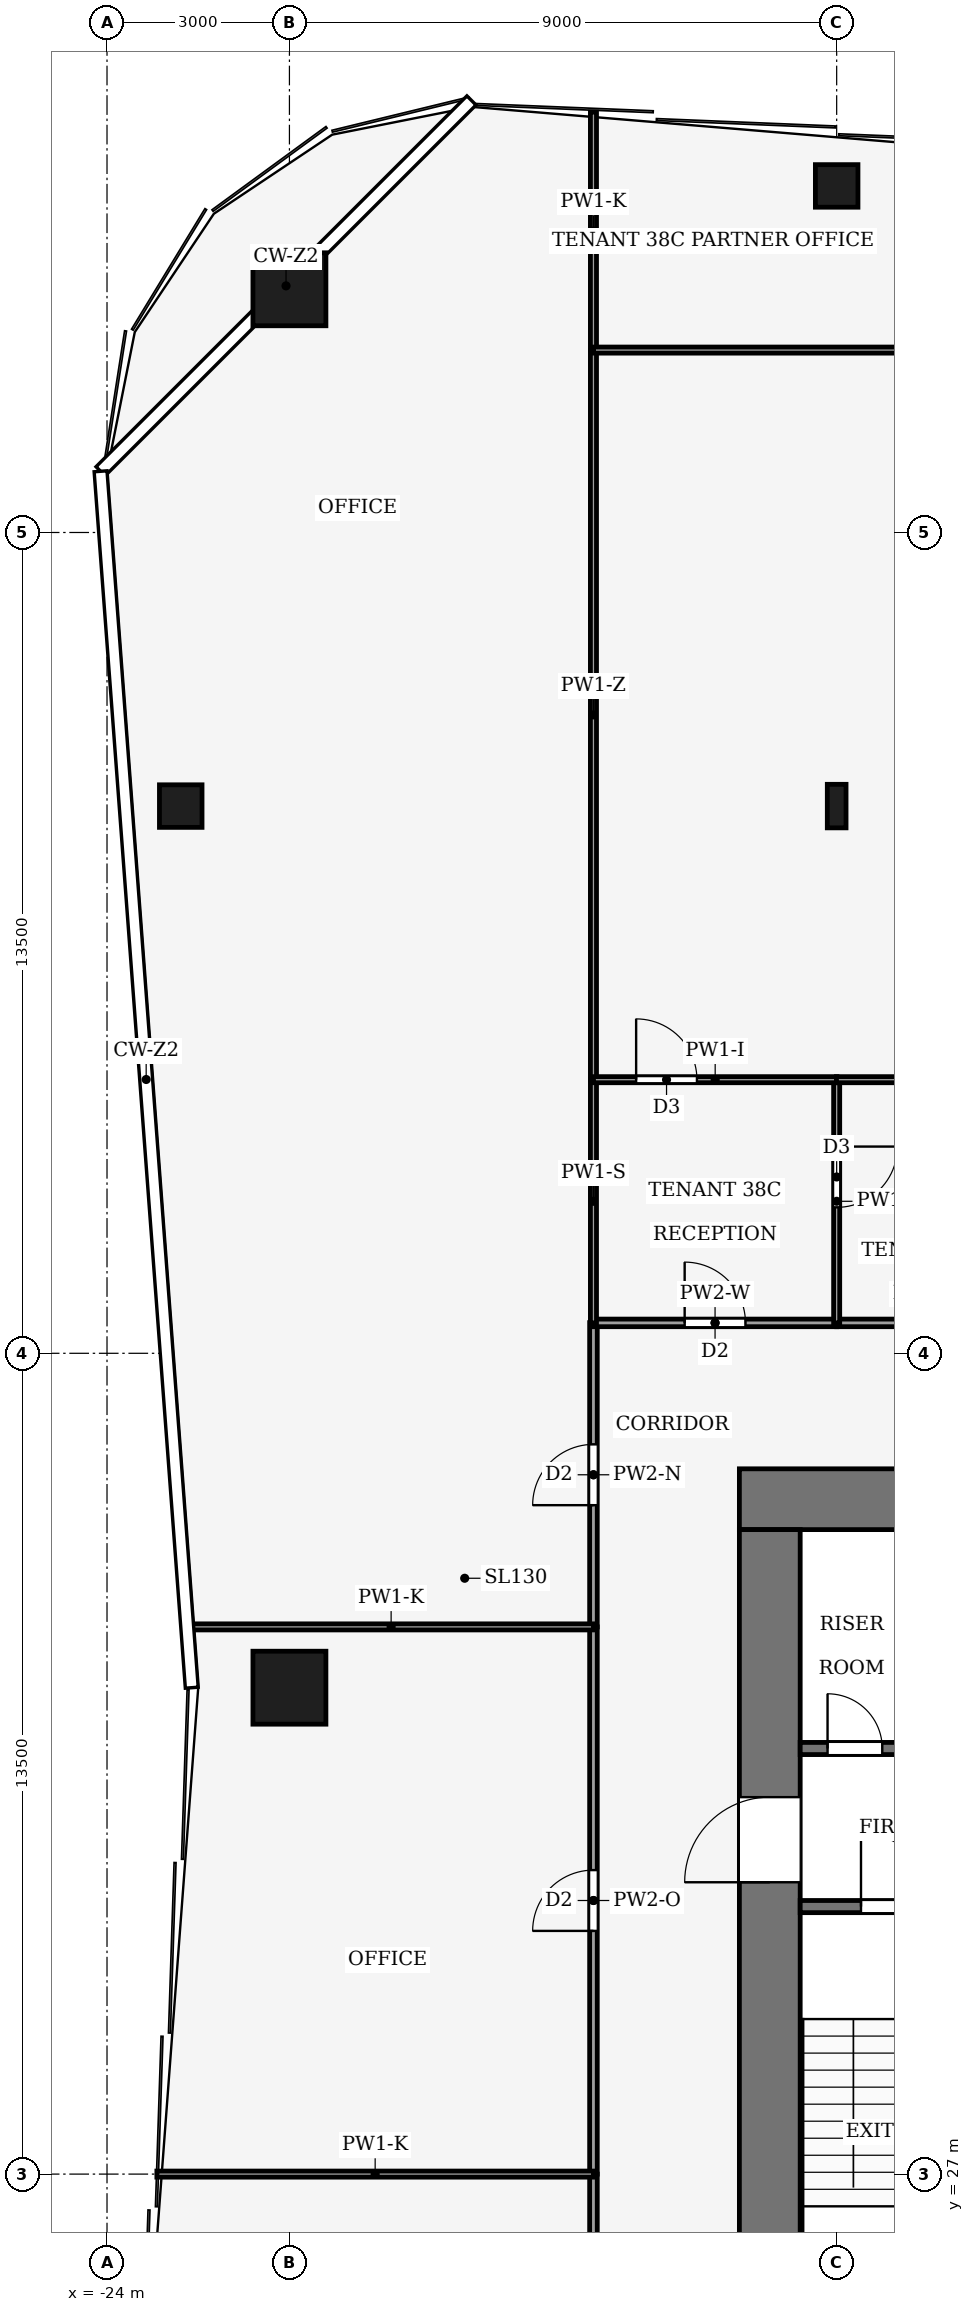
"""IFC4 building model, lengths in metres.
Left out: names, types, materials, properties, quantities, classifications, styles, units other than length and angle.
Written with IfcOpenShell. Run it as: python <this file> out.ifc"""

import sys

from ifc_helpers import new_model, si_unit, direction, frame, frame_2d, origin, origin_2d, place, context, subcontext, project, spatial, rectangle, hollow_rectangle, i_section, extrude, element, fill, save


model = new_model("IFC4")
c1 = context("Model", 3, precision=1e-05, world=origin(), true_north=direction((0.0, 1.0)))
c2 = subcontext(c1, "Body", "Model", "MODEL_VIEW")
j1 = project(units=[si_unit("LENGTHUNIT", "METRE"), si_unit("PLANEANGLEUNIT", "RADIAN")], contexts=[c1])
p1 = place(None, origin())
s1 = spatial("IfcSite", under=j1, at=p1, CompositionType="ELEMENT")
p2 = place(p1, origin())
s2 = spatial("IfcBuilding", under=s1, at=p2, CompositionType="ELEMENT")
p3 = place(p2, frame((0.0, 0.0, 166.0)))
s3 = spatial("IfcBuildingStorey", under=s2, at=p3, CompositionType="ELEMENT", Elevation=166.0)
p4 = place(p3, frame((-13.6, 38.1, -0.13), z_axis=(0.0, 0.0, 1.0), x_axis=(1.0, 0.0, 0.0)))
e1 = element("IfcWall", 1, at=p4, inside=s3, PredefinedType="SHEAR", context=c2, shape_type="SweptSolid", body=[
    extrude(rectangle(XDim=27.2, YDim=1.0, at=frame_2d((13.6, 0.0))), origin(), (0.0, 0.0, 1.0), 3.88),
])
p5 = place(p3, frame((-13.1, 18.4, -0.13), z_axis=(0.0, 0.0, 1.0), x_axis=(0.0, 1.0, 0.0)))
e2 = element("IfcWall", 2, at=p5, inside=s3, PredefinedType="SHEAR", context=c2, shape_type="SweptSolid", body=[
    extrude(rectangle(XDim=19.2, YDim=1.0, at=frame_2d((9.6, 0.0))), origin(), (0.0, 0.0, 1.0), 3.88),
])
p6 = place(p5, frame((2.8, 0.0, 0.13)))
e3 = element("IfcOpeningElement", 3, at=p6, cuts=e2, PredefinedType="OPENING", context=c2, shape_type="SweptSolid", body=[
    extrude(rectangle(XDim=2.4, YDim=2.4, at=frame_2d((1.2, 1.2))), frame((0.0, 0.51, 0.0), z_axis=(0.0, -1.0, 0.0), x_axis=(1.0, 0.0, 0.0)), (0.0, 0.0, 1.0), 1.02),
])
p7 = place(p5, frame((13.4, 0.0, 0.13)))
e4 = element("IfcOpeningElement", 4, at=p7, cuts=e2, PredefinedType="OPENING", context=c2, shape_type="SweptSolid", body=[
    extrude(rectangle(XDim=1.4, YDim=2.2, at=frame_2d((0.7, 1.1))), frame((0.0, 0.51, 0.0), z_axis=(0.0, -1.0, 0.0), x_axis=(1.0, 0.0, 0.0)), (0.0, 0.0, 1.0), 1.02),
])
for number, where, z_axis, x_axis in (
    (5, (-21.0, 58.0, 0.0), (0.0, 0.0, 1.0), (1.0, 0.0, 0.0)),
    (6, (-21.0, 35.0, 0.0), (0.0, 0.0, 1.0), (1.0, 0.0, 0.0)),
):
    element("IfcColumn", number, at=place(p3, frame(where, z_axis=z_axis, x_axis=x_axis)), inside=s3, PredefinedType="COLUMN", context=c2, shape_type="SweptSolid", body=[
        extrude(hollow_rectangle(XDim=1.2, YDim=1.2, WallThickness=0.07, at=origin_2d()), origin(), (0.0, 0.0, 1.0), 4.0),
    ])
for number, where, z_axis, x_axis in (
    (7, (-12.0, 59.7, 0.0), (0.0, 0.0, 1.0), (1.0, 0.0, 0.0)),
    (8, (-22.788, 49.5, 0.0), (0.0, 0.0, 1.0), (1.0, 0.0, 0.0)),
):
    element("IfcColumn", number, at=place(p3, frame(where, z_axis=z_axis, x_axis=x_axis)), inside=s3, PredefinedType="COLUMN", context=c2, shape_type="SweptSolid", body=[
        extrude(hollow_rectangle(XDim=0.7, YDim=0.7, WallThickness=0.03, at=origin_2d()), origin(), (0.0, 0.0, 1.0), 4.0),
    ])
p8 = place(p3, frame((-12.0, 49.5, 0.0), z_axis=(0.0, 0.0, 1.0), x_axis=(1.0, 0.0, 0.0)))
e9 = element("IfcColumn", 9, at=p8, inside=s3, PredefinedType="COLUMN", context=c2, shape_type="SweptSolid", body=[
    extrude(i_section(OverallWidth=0.308, OverallDepth=0.716, WebThickness=0.021, FlangeThickness=0.04, FilletRadius=0.027, at=origin_2d()), origin(), (0.0, 0.0, 1.0), 4.0),
])
p9 = place(p3, frame((-12.6, 31.4, 0.0), z_axis=(0.0, 0.0, 1.0), x_axis=(1.0, 0.0, 0.0)))
e10 = element("IfcWall", 10, at=p9, inside=s3, PredefinedType="PARTITIONING", context=c2, shape_type="SweptSolid", body=[
    extrude(rectangle(XDim=6.6, YDim=0.2, at=frame_2d((3.3, 0.0))), origin(), (0.0, 0.0, 1.0), 3.75),
])
p10 = place(p9, frame((1.0, 0.0, 0.0)))
e11 = element("IfcOpeningElement", 11, at=p10, cuts=e10, PredefinedType="OPENING", context=c2, shape_type="SweptSolid", body=[
    extrude(rectangle(XDim=1.2, YDim=2.2, at=frame_2d((0.6, 1.1))), frame((0.0, 0.11, 0.0), z_axis=(0.0, -1.0, 0.0), x_axis=(1.0, 0.0, 0.0)), (0.0, 0.0, 1.0), 0.22),
])
p11 = place(p3, frame((-12.6, 34.0, 0.0), z_axis=(0.0, 0.0, 1.0), x_axis=(1.0, 0.0, 0.0)))
e12 = element("IfcWall", 12, at=p11, inside=s3, PredefinedType="PARTITIONING", context=c2, shape_type="SweptSolid", body=[
    extrude(rectangle(XDim=6.6, YDim=0.2, at=frame_2d((3.3, 0.0))), origin(), (0.0, 0.0, 1.0), 3.75),
])
p12 = place(p11, frame((4.7, 0.0, 0.0)))
e13 = element("IfcOpeningElement", 13, at=p12, cuts=e12, PredefinedType="OPENING", context=c2, shape_type="SweptSolid", body=[
    extrude(rectangle(XDim=1.4, YDim=2.2, at=frame_2d((0.7, 1.1))), frame((0.0, 0.11, 0.0), z_axis=(0.0, -1.0, 0.0), x_axis=(1.0, 0.0, 0.0)), (0.0, 0.0, 1.0), 0.22),
])
p13 = place(p11, frame((2.3, 0.0, 0.0)))
e14 = element("IfcOpeningElement", 14, at=p13, cuts=e12, PredefinedType="OPENING", context=c2, shape_type="SweptSolid", body=[
    extrude(rectangle(XDim=1.4, YDim=2.2, at=frame_2d((0.7, 1.1))), frame((0.0, 0.11, 0.0), z_axis=(0.0, -1.0, 0.0), x_axis=(1.0, 0.0, 0.0)), (0.0, 0.0, 1.0), 0.22),
])
p14 = place(p11, frame((0.45, 0.0, 0.0)))
e15 = element("IfcOpeningElement", 15, at=p14, cuts=e12, PredefinedType="OPENING", context=c2, shape_type="SweptSolid", body=[
    extrude(rectangle(XDim=0.9, YDim=2.1, at=frame_2d((0.45, 1.05))), frame((0.0, 0.11, 0.0), z_axis=(0.0, -1.0, 0.0), x_axis=(1.0, 0.0, 0.0)), (0.0, 0.0, 1.0), 0.22),
])
p15 = place(p3, frame((-16.0, 24.0, 0.0), z_axis=(0.0, 0.0, 1.0), x_axis=(0.0, 1.0, 0.0)))
e16 = element("IfcWall", 16, at=p15, inside=s3, PredefinedType="PARTITIONING", context=c2, shape_type="SweptSolid", body=[
    extrude(rectangle(XDim=3.0, YDim=0.125, at=frame_2d((1.5, 0.0))), origin(), (0.0, 0.0, 1.0), 3.75),
])
p16 = place(p15, frame((1.05, 0.0, 0.0)))
e17 = element("IfcOpeningElement", 17, at=p16, cuts=e16, PredefinedType="OPENING", context=c2, shape_type="SweptSolid", body=[
    extrude(rectangle(XDim=0.9, YDim=2.1, at=frame_2d((0.45, 1.05))), frame((0.0, 0.073, 0.0), z_axis=(0.0, -1.0, 0.0), x_axis=(1.0, 0.0, 0.0)), (0.0, 0.0, 1.0), 0.145),
])
p17 = place(p3, frame((-16.0, 27.0, 0.0), z_axis=(0.0, 0.0, 1.0), x_axis=(0.0, 1.0, 0.0)))
e18 = element("IfcWall", 18, at=p17, inside=s3, PredefinedType="PARTITIONING", context=c2, shape_type="SweptSolid", body=[
    extrude(rectangle(XDim=9.0, YDim=0.125, at=frame_2d((4.5, 0.0))), origin(), (0.0, 0.0, 1.0), 3.36),
])
p18 = place(p17, frame((4.0, 0.0, 0.0)))
e19 = element("IfcOpeningElement", 19, at=p18, cuts=e18, PredefinedType="OPENING", context=c2, shape_type="SweptSolid", body=[
    extrude(rectangle(XDim=1.0, YDim=2.1, at=frame_2d((0.5, 1.05))), frame((0.0, 0.073, 0.0), z_axis=(0.0, -1.0, 0.0), x_axis=(1.0, 0.0, 0.0)), (0.0, 0.0, 1.0), 0.145),
])
p19 = place(p3, frame((-16.0, 36.0, 0.0), z_axis=(0.0, 0.0, 1.0), x_axis=(0.0, 1.0, 0.0)))
e20 = element("IfcWall", 20, at=p19, inside=s3, PredefinedType="PARTITIONING", context=c2, shape_type="SweptSolid", body=[
    extrude(rectangle(XDim=5.004, YDim=0.125, at=frame_2d((2.502, 0.0))), origin(), (0.0, 0.0, 1.0), 3.02),
])
p20 = place(p19, frame((2.002, 0.0, 0.0)))
e21 = element("IfcOpeningElement", 21, at=p20, cuts=e20, PredefinedType="OPENING", context=c2, shape_type="SweptSolid", body=[
    extrude(rectangle(XDim=1.0, YDim=2.1, at=frame_2d((0.5, 1.05))), frame((0.0, 0.073, 0.0), z_axis=(0.0, -1.0, 0.0), x_axis=(1.0, 0.0, 0.0)), (0.0, 0.0, 1.0), 0.145),
])
p21 = place(p3, frame((-16.0, 41.0, 0.0), z_axis=(0.0, 0.0, 1.0), x_axis=(1.0, 0.0, 0.0)))
e22 = element("IfcWall", 22, at=p21, inside=s3, PredefinedType="PARTITIONING", context=c2, shape_type="SweptSolid", body=[
    extrude(rectangle(XDim=4.0, YDim=0.125, at=frame_2d((2.0, 0.0))), origin(), (0.0, 0.0, 1.0), 3.32),
])
p22 = place(p21, frame((1.5, 0.0, 0.0)))
e23 = element("IfcOpeningElement", 23, at=p22, cuts=e22, PredefinedType="OPENING", context=c2, shape_type="SweptSolid", body=[
    extrude(rectangle(XDim=1.0, YDim=2.1, at=frame_2d((0.5, 1.05))), frame((0.0, 0.073, 0.0), z_axis=(0.0, -1.0, 0.0), x_axis=(1.0, 0.0, 0.0)), (0.0, 0.0, 1.0), 0.145),
])
p23 = place(p3, frame((-9.0, 41.0, 0.0), z_axis=(0.0, 0.0, 1.0), x_axis=(-1.0, 0.0, 0.0)))
e24 = element("IfcWall", 24, at=p23, inside=s3, PredefinedType="PARTITIONING", context=c2, shape_type="SweptSolid", body=[
    extrude(rectangle(XDim=3.0, YDim=0.125, at=frame_2d((1.5, 0.0))), origin(), (0.0, 0.0, 1.0), 3.32),
])
p24 = place(p3, frame((-16.0, 27.0, 0.0), z_axis=(0.0, 0.0, 1.0), x_axis=(-1.0, 0.0, 0.0)))
e25 = element("IfcWall", 25, at=p24, inside=s3, PredefinedType="PARTITIONING", context=c2, shape_type="SweptSolid", body=[
    extrude(rectangle(XDim=7.18, YDim=0.1, at=frame_2d((3.59, 0.0))), origin(), (0.0, 0.0, 1.0), 2.92),
])
p25 = place(p3, frame((-16.0, 36.0, 0.0), z_axis=(0.0, 0.0, 1.0), x_axis=(-1.0, 0.0, 0.0)))
e26 = element("IfcWall", 26, at=p25, inside=s3, PredefinedType="PARTITIONING", context=c2, shape_type="SweptSolid", body=[
    extrude(rectangle(XDim=6.655, YDim=0.1, at=frame_2d((3.328, 0.0))), origin(), (0.0, 0.0, 1.0), 2.92),
])
p26 = place(p3, frame((-16.0, 41.0, 0.0), z_axis=(0.0, 0.0, 1.0), x_axis=(0.0, 1.0, 0.0)))
e27 = element("IfcWall", 27, at=p26, inside=s3, PredefinedType="PARTITIONING", context=c2, shape_type="SweptSolid", body=[
    extrude(rectangle(XDim=4.0, YDim=0.1, at=frame_2d((2.0, 0.0))), origin(), (0.0, 0.0, 1.0), 3.32),
])
p27 = place(p3, frame((-16.0, 45.0, 0.0), z_axis=(0.0, 0.0, 1.0), x_axis=(0.0, 1.0, 0.0)))
e28 = element("IfcWall", 28, at=p27, inside=s3, PredefinedType="PARTITIONING", context=c2, shape_type="SweptSolid", body=[
    extrude(rectangle(XDim=12.0, YDim=0.1, at=frame_2d((6.0, 0.0))), origin(), (0.0, 0.0, 1.0), 3.12),
])
p28 = place(p3, frame((-16.0, 57.0, 0.0), z_axis=(0.0, 0.0, 1.0), x_axis=(0.0, 1.0, 0.0)))
e29 = element("IfcWall", 29, at=p28, inside=s3, PredefinedType="PARTITIONING", context=c2, shape_type="SweptSolid", body=[
    extrude(rectangle(XDim=3.913, YDim=0.1, at=frame_2d((1.957, 0.0))), origin(), (0.0, 0.0, 1.0), 2.92),
])
p29 = place(p3, frame((-12.0, 45.0, 0.0), z_axis=(0.0, 0.0, 1.0), x_axis=(0.0, -1.0, 0.0)))
e30 = element("IfcWall", 30, at=p29, inside=s3, PredefinedType="PARTITIONING", context=c2, shape_type="SweptSolid", body=[
    extrude(rectangle(XDim=4.0, YDim=0.1, at=frame_2d((2.0, 0.0))), origin(), (0.0, 0.0, 1.0), 3.32),
])
p30 = place(p29, frame((1.1, 0.0, 0.0)))
e31 = element("IfcOpeningElement", 31, at=p30, cuts=e30, PredefinedType="OPENING", context=c2, shape_type="SweptSolid", body=[
    extrude(rectangle(XDim=1.0, YDim=2.1, at=frame_2d((0.5, 1.05))), frame((0.0, 0.06, 0.0), z_axis=(0.0, -1.0, 0.0), x_axis=(1.0, 0.0, 0.0)), (0.0, 0.0, 1.0), 0.12),
])
p31 = place(p3, frame((-16.0, 45.0, 0.0), z_axis=(0.0, 0.0, 1.0), x_axis=(1.0, 0.0, 0.0)))
e32 = element("IfcWall", 32, at=p31, inside=s3, PredefinedType="PARTITIONING", context=c2, shape_type="SweptSolid", body=[
    extrude(rectangle(XDim=4.004, YDim=0.1, at=frame_2d((2.002, 0.0))), origin(), (0.0, 0.0, 1.0), 3.75),
])
p32 = place(p31, frame((0.702, 0.0, 0.0)))
e33 = element("IfcOpeningElement", 33, at=p32, cuts=e32, PredefinedType="OPENING", context=c2, shape_type="SweptSolid", body=[
    extrude(rectangle(XDim=1.0, YDim=2.1, at=frame_2d((0.5, 1.05))), frame((0.0, 0.06, 0.0), z_axis=(0.0, -1.0, 0.0), x_axis=(1.0, 0.0, 0.0)), (0.0, 0.0, 1.0), 0.12),
])
p33 = place(p3, frame((-8.996, 45.0, 0.0), z_axis=(0.0, 0.0, 1.0), x_axis=(-1.0, 0.0, 0.0)))
e34 = element("IfcWall", 34, at=p33, inside=s3, PredefinedType="PARTITIONING", context=c2, shape_type="SweptSolid", body=[
    extrude(rectangle(XDim=3.008, YDim=0.1, at=frame_2d((1.504, 0.0))), origin(), (0.0, 0.0, 1.0), 3.75),
])
p34 = place(p3, frame((-16.0, 57.0, 0.0), z_axis=(0.0, 0.0, 1.0), x_axis=(1.0, 0.0, 0.0)))
e35 = element("IfcWall", 35, at=p34, inside=s3, PredefinedType="PARTITIONING", context=c2, shape_type="SweptSolid", body=[
    extrude(rectangle(XDim=13.0, YDim=0.1, at=frame_2d((6.5, 0.0))), origin(), (0.0, 0.0, 1.0), 3.32),
])
p35 = place(p34, frame((6.8, 0.0, 0.0)))
e36 = element("IfcOpeningElement", 36, at=p35, cuts=e35, PredefinedType="OPENING", context=c2, shape_type="SweptSolid", body=[
    extrude(rectangle(XDim=1.0, YDim=2.1, at=frame_2d((0.5, 1.05))), frame((0.0, 0.06, 0.0), z_axis=(0.0, -1.0, 0.0), x_axis=(1.0, 0.0, 0.0)), (0.0, 0.0, 1.0), 0.12),
])
p36 = place(p14, origin())
e37 = element("IfcDoor", 37, at=p36, inside=s3, OperationType="SINGLE_SWING_RIGHT", PredefinedType="DOOR", context=c2, shape_type="SweptSolid", body=[
    extrude(rectangle(XDim=0.9, YDim=2.1, at=frame_2d((0.45, 1.05))), frame((0.0, 0.025, 0.0), z_axis=(0.0, -1.0, 0.0), x_axis=(1.0, 0.0, 0.0)), (0.0, 0.0, 1.0), 0.05),
])
fill(e15, e37)
p37 = place(p10, origin())
e38 = element("IfcDoor", 38, at=p37, inside=s3, OperationType="SINGLE_SWING_RIGHT", PredefinedType="DOOR", context=c2, shape_type="SweptSolid", body=[
    extrude(rectangle(XDim=1.2, YDim=2.2, at=frame_2d((0.6, 1.1))), frame((0.0, 0.025, 0.0), z_axis=(0.0, -1.0, 0.0), x_axis=(1.0, 0.0, 0.0)), (0.0, 0.0, 1.0), 0.05),
])
fill(e11, e38)
p38 = place(p7, origin())
e39 = element("IfcDoor", 39, at=p38, inside=s3, OperationType="SINGLE_SWING_RIGHT", PredefinedType="DOOR", context=c2, shape_type="SweptSolid", body=[
    extrude(rectangle(XDim=1.4, YDim=2.2, at=frame_2d((0.7, 1.1))), frame((0.0, 0.025, 0.0), z_axis=(0.0, -1.0, 0.0), x_axis=(1.0, 0.0, 0.0)), (0.0, 0.0, 1.0), 0.05),
])
fill(e4, e39)
p39 = place(p18, origin())
e40 = element("IfcDoor", 40, at=p39, inside=s3, OperationType="SINGLE_SWING_RIGHT", PredefinedType="DOOR", context=c2, shape_type="SweptSolid", body=[
    extrude(rectangle(XDim=1.0, YDim=2.1, at=frame_2d((0.5, 1.05))), frame((0.0, 0.025, 0.0), z_axis=(0.0, -1.0, 0.0), x_axis=(1.0, 0.0, 0.0)), (0.0, 0.0, 1.0), 0.05),
])
fill(e19, e40)
p40 = place(p20, origin())
e41 = element("IfcDoor", 41, at=p40, inside=s3, OperationType="SINGLE_SWING_LEFT", PredefinedType="DOOR", context=c2, shape_type="SweptSolid", body=[
    extrude(rectangle(XDim=1.0, YDim=2.1, at=frame_2d((0.5, 1.05))), frame((0.0, 0.025, 0.0), z_axis=(0.0, -1.0, 0.0), x_axis=(1.0, 0.0, 0.0)), (0.0, 0.0, 1.0), 0.05),
])
fill(e21, e41)
p41 = place(p22, origin())
e42 = element("IfcDoor", 42, at=p41, inside=s3, OperationType="SINGLE_SWING_LEFT", PredefinedType="DOOR", context=c2, shape_type="SweptSolid", body=[
    extrude(rectangle(XDim=1.0, YDim=2.1, at=frame_2d((0.5, 1.05))), frame((0.0, 0.025, 0.0), z_axis=(0.0, -1.0, 0.0), x_axis=(1.0, 0.0, 0.0)), (0.0, 0.0, 1.0), 0.05),
])
fill(e23, e42)
p42 = place(p30, origin())
e43 = element("IfcDoor", 43, at=p42, inside=s3, OperationType="SINGLE_SWING_LEFT", PredefinedType="DOOR", context=c2, shape_type="SweptSolid", body=[
    extrude(rectangle(XDim=1.0, YDim=2.1, at=frame_2d((0.5, 1.05))), frame((0.0, 0.025, 0.0), z_axis=(0.0, -1.0, 0.0), x_axis=(1.0, 0.0, 0.0)), (0.0, 0.0, 1.0), 0.05),
])
fill(e31, e43)
p43 = place(p32, origin())
e44 = element("IfcDoor", 44, at=p43, inside=s3, OperationType="SINGLE_SWING_LEFT", PredefinedType="DOOR", context=c2, shape_type="SweptSolid", body=[
    extrude(rectangle(XDim=1.0, YDim=2.1, at=frame_2d((0.5, 1.05))), frame((0.0, 0.025, 0.0), z_axis=(0.0, -1.0, 0.0), x_axis=(1.0, 0.0, 0.0)), (0.0, 0.0, 1.0), 0.05),
])
fill(e33, e44)
save(model, sys.argv[1])
